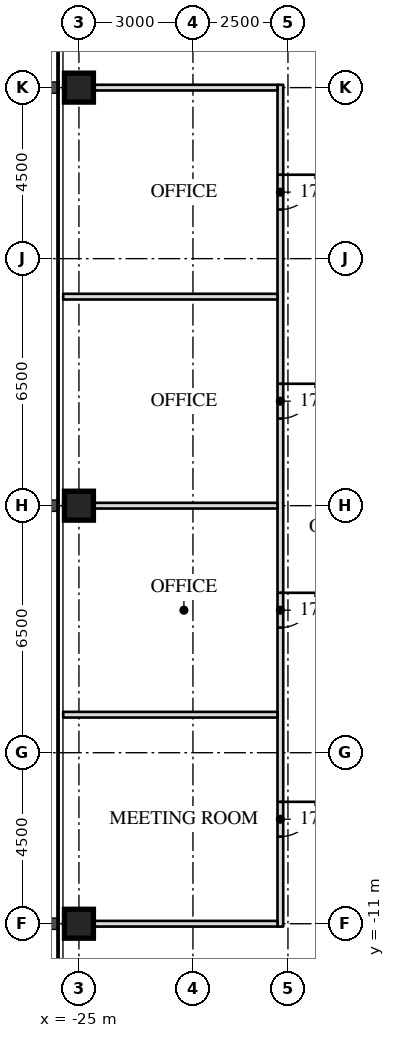
"""IFC4 building model, lengths in metres.
Left out: names, types, materials, properties, quantities, classifications, styles, units other than length and angle.
Written with IfcOpenShell. Run it as: python <this file> out.ifc"""

import sys

from ifc_helpers import new_model, si_unit, direction, frame, frame_2d, origin, origin_2d, place, context, subcontext, project, spatial, rectangle, hollow_rectangle, extrude, element, fill, save


model = new_model("IFC4")
c1 = context("Model", 3, precision=1e-05, world=origin(), true_north=direction((0.0, 1.0)))
c2 = subcontext(c1, "Body", "Model", "MODEL_VIEW")
j1 = project(units=[si_unit("LENGTHUNIT", "METRE"), si_unit("PLANEANGLEUNIT", "RADIAN")], contexts=[c1])
p1 = place(None, origin())
s1 = spatial("IfcSite", under=j1, at=p1, CompositionType="ELEMENT")
p2 = place(p1, origin())
s2 = spatial("IfcBuilding", under=s1, at=p2, CompositionType="ELEMENT")
p3 = place(p2, frame((0.0, 0.0, 73.4)))
s3 = spatial("IfcBuildingStorey", under=s2, at=p3, CompositionType="ELEMENT", Elevation=73.4)
for number, where, z_axis, x_axis in (
    (1, (-25.0, 0.0, 0.0), (0.0, 0.0, 1.0), (0.0, 1.0, 0.0)),
    (2, (-25.0, -11.0, 0.0), (0.0, 0.0, 1.0), (0.0, 1.0, 0.0)),
    (3, (-25.0, 11.0, 0.0), (0.0, 0.0, 1.0), (0.0, 1.0, 0.0)),
):
    element("IfcColumn", number, at=place(p3, frame(where, z_axis=z_axis, x_axis=x_axis)), inside=s3, PredefinedType="COLUMN", context=c2, shape_type="SweptSolid", body=[
        extrude(hollow_rectangle(XDim=0.762, YDim=0.762, WallThickness=0.127, at=origin_2d()), origin(), (0.0, 0.0, 1.0), 4.1),
    ])
p4 = place(p3, frame((-19.7, 11.075, 0.0), z_axis=(0.0, 0.0, 1.0), x_axis=(0.0, -1.0, 0.0)))
e4 = element("IfcWall", 4, at=p4, inside=s3, PredefinedType="PARTITIONING", context=c2, shape_type="SweptSolid", body=[
    extrude(rectangle(XDim=22.15, YDim=0.15, at=frame_2d((11.075, 0.0))), origin(), (0.0, 0.0, 1.0), 3.91),
])
p5 = place(p4, frame((2.367, 0.0, 0.0)))
e5 = element("IfcOpeningElement", 5, at=p5, cuts=e4, PredefinedType="OPENING", context=c2, shape_type="SweptSolid", body=[
    extrude(rectangle(XDim=0.915, YDim=2.134, at=frame_2d((0.458, 1.067))), frame((0.0, 0.085, 0.0), z_axis=(0.0, -1.0, 0.0), x_axis=(1.0, 0.0, 0.0)), (0.0, 0.0, 1.0), 0.17),
])
p6 = place(p4, frame((7.867, 0.0, 0.0)))
e6 = element("IfcOpeningElement", 6, at=p6, cuts=e4, PredefinedType="OPENING", context=c2, shape_type="SweptSolid", body=[
    extrude(rectangle(XDim=0.915, YDim=2.134, at=frame_2d((0.458, 1.067))), frame((0.0, 0.085, 0.0), z_axis=(0.0, -1.0, 0.0), x_axis=(1.0, 0.0, 0.0)), (0.0, 0.0, 1.0), 0.17),
])
p7 = place(p4, frame((13.367, 0.0, 0.0)))
e7 = element("IfcOpeningElement", 7, at=p7, cuts=e4, PredefinedType="OPENING", context=c2, shape_type="SweptSolid", body=[
    extrude(rectangle(XDim=0.915, YDim=2.134, at=frame_2d((0.458, 1.067))), frame((0.0, 0.085, 0.0), z_axis=(0.0, -1.0, 0.0), x_axis=(1.0, 0.0, 0.0)), (0.0, 0.0, 1.0), 0.17),
])
p8 = place(p4, frame((18.867, 0.0, 0.0)))
e8 = element("IfcOpeningElement", 8, at=p8, cuts=e4, PredefinedType="OPENING", context=c2, shape_type="SweptSolid", body=[
    extrude(rectangle(XDim=0.915, YDim=2.134, at=frame_2d((0.458, 1.067))), frame((0.0, 0.085, 0.0), z_axis=(0.0, -1.0, 0.0), x_axis=(1.0, 0.0, 0.0)), (0.0, 0.0, 1.0), 0.17),
])
p9 = place(p3, frame((-19.775, 11.0, 0.0), z_axis=(0.0, 0.0, 1.0), x_axis=(-1.0, 0.0, 0.0)))
e9 = element("IfcWall", 9, at=p9, inside=s3, PredefinedType="PARTITIONING", context=c2, shape_type="SweptSolid", body=[
    extrude(rectangle(XDim=5.64, YDim=0.15, at=frame_2d((2.82, 0.0))), origin(), (0.0, 0.0, 1.0), 3.13),
])
p10 = place(p3, frame((-19.775, 5.5, 0.0), z_axis=(0.0, 0.0, 1.0), x_axis=(-1.0, 0.0, 0.0)))
e10 = element("IfcWall", 10, at=p10, inside=s3, PredefinedType="PARTITIONING", context=c2, shape_type="SweptSolid", body=[
    extrude(rectangle(XDim=5.64, YDim=0.15, at=frame_2d((2.82, 0.0))), origin(), (0.0, 0.0, 1.0), 3.91),
])
p11 = place(p3, frame((-19.775, 0.0, 0.0), z_axis=(0.0, 0.0, 1.0), x_axis=(-1.0, 0.0, 0.0)))
e11 = element("IfcWall", 11, at=p11, inside=s3, PredefinedType="PARTITIONING", context=c2, shape_type="SweptSolid", body=[
    extrude(rectangle(XDim=5.64, YDim=0.15, at=frame_2d((2.82, 0.0))), origin(), (0.0, 0.0, 1.0), 3.13),
])
p12 = place(p3, frame((-19.775, -5.5, 0.0), z_axis=(0.0, 0.0, 1.0), x_axis=(-1.0, 0.0, 0.0)))
e12 = element("IfcWall", 12, at=p12, inside=s3, PredefinedType="PARTITIONING", context=c2, shape_type="SweptSolid", body=[
    extrude(rectangle(XDim=5.64, YDim=0.15, at=frame_2d((2.82, 0.0))), origin(), (0.0, 0.0, 1.0), 3.91),
])
p13 = place(p3, frame((-19.775, -11.0, 0.0), z_axis=(0.0, 0.0, 1.0), x_axis=(-1.0, 0.0, 0.0)))
e13 = element("IfcWall", 13, at=p13, inside=s3, PredefinedType="PARTITIONING", context=c2, shape_type="SweptSolid", body=[
    extrude(rectangle(XDim=5.64, YDim=0.15, at=frame_2d((2.82, 0.0))), origin(), (0.0, 0.0, 1.0), 3.13),
])
p14 = place(p5, origin())
e14 = element("IfcDoor", 14, at=p14, inside=s3, OperationType="SINGLE_SWING_LEFT", PredefinedType="DOOR", context=c2, shape_type="SweptSolid", body=[
    extrude(rectangle(XDim=0.915, YDim=2.134, at=frame_2d((0.458, 1.067))), frame((0.0, 0.025, 0.0), z_axis=(0.0, -1.0, 0.0), x_axis=(1.0, 0.0, 0.0)), (0.0, 0.0, 1.0), 0.05),
])
fill(e5, e14)
p15 = place(p6, origin())
e15 = element("IfcDoor", 15, at=p15, inside=s3, OperationType="SINGLE_SWING_LEFT", PredefinedType="DOOR", context=c2, shape_type="SweptSolid", body=[
    extrude(rectangle(XDim=0.915, YDim=2.134, at=frame_2d((0.458, 1.067))), frame((0.0, 0.025, 0.0), z_axis=(0.0, -1.0, 0.0), x_axis=(1.0, 0.0, 0.0)), (0.0, 0.0, 1.0), 0.05),
])
fill(e6, e15)
p16 = place(p7, origin())
e16 = element("IfcDoor", 16, at=p16, inside=s3, OperationType="SINGLE_SWING_LEFT", PredefinedType="DOOR", context=c2, shape_type="SweptSolid", body=[
    extrude(rectangle(XDim=0.915, YDim=2.134, at=frame_2d((0.458, 1.067))), frame((0.0, 0.025, 0.0), z_axis=(0.0, -1.0, 0.0), x_axis=(1.0, 0.0, 0.0)), (0.0, 0.0, 1.0), 0.05),
])
fill(e7, e16)
p17 = place(p8, origin())
e17 = element("IfcDoor", 17, at=p17, inside=s3, OperationType="SINGLE_SWING_LEFT", PredefinedType="DOOR", context=c2, shape_type="SweptSolid", body=[
    extrude(rectangle(XDim=0.915, YDim=2.134, at=frame_2d((0.458, 1.067))), frame((0.0, 0.025, 0.0), z_axis=(0.0, -1.0, 0.0), x_axis=(1.0, 0.0, 0.0)), (0.0, 0.0, 1.0), 0.05),
])
fill(e8, e17)
save(model, sys.argv[1])
